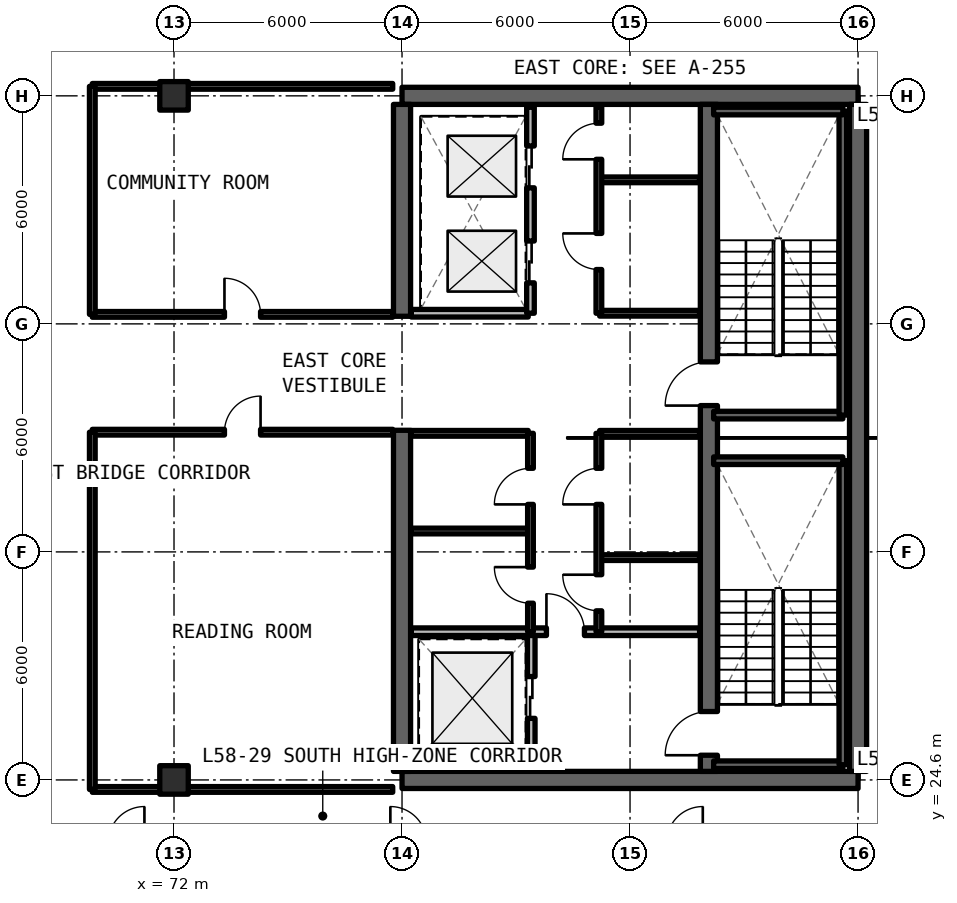
"""IFC4 building model, lengths in metres.
Left out: names, types, materials, properties, quantities, classifications, styles, units other than length and angle.
Written with IfcOpenShell. Run it as: python <this file> out.ifc"""

import sys

from ifc_helpers import new_model, si_unit, direction, frame, frame_2d, origin, origin_2d, place, context, subcontext, project, spatial, rectangle, extrude, element, fill, save


model = new_model("IFC4")
c1 = context("Model", 3, precision=1e-05, world=origin(), true_north=direction((0.0, 1.0)))
c2 = subcontext(c1, "Body", "Model", "MODEL_VIEW")
j1 = project(units=[si_unit("LENGTHUNIT", "METRE"), si_unit("PLANEANGLEUNIT", "RADIAN")], contexts=[c1])
p1 = place(None, origin())
s1 = spatial("IfcSite", under=j1, at=p1, CompositionType="ELEMENT")
p2 = place(p1, origin())
s2 = spatial("IfcBuilding", under=s1, at=p2, CompositionType="ELEMENT")
p3 = place(p2, frame((0.0, 0.0, 208.23)))
s3 = spatial("IfcBuildingStorey", under=s2, at=p3, CompositionType="ELEMENT", Elevation=208.23)
for number, where, z_axis, x_axis in (
    (1, (78.0, 24.6, 0.0), (0.0, 0.0, 1.0), (1.0, 0.0, 0.0)),
    (2, (90.0, 42.6, 0.0), (0.0, 0.0, 1.0), (-1.0, 0.0, 0.0)),
):
    element("IfcWall", number, at=place(p3, frame(where, z_axis=z_axis, x_axis=x_axis)), inside=s3, PredefinedType="SHEAR", context=c2, shape_type="SweptSolid", body=[
        extrude(rectangle(XDim=12.0, YDim=0.45, at=frame_2d((6.0, 0.0))), origin(), (0.0, 0.0, 1.0), 3.63),
    ])
p4 = place(p3, frame((90.0, 24.825, 0.0), z_axis=(0.0, 0.0, 1.0), x_axis=(0.0, 1.0, 0.0)))
e3 = element("IfcWall", 3, at=p4, inside=s3, PredefinedType="SHEAR", context=c2, shape_type="SweptSolid", body=[
    extrude(rectangle(XDim=17.55, YDim=0.45, at=frame_2d((8.775, 0.0))), origin(), (0.0, 0.0, 1.0), 3.63),
])
p5 = place(p3, frame((78.0, 24.825, 0.0), z_axis=(0.0, 0.0, 1.0), x_axis=(0.0, 1.0, 0.0)))
e4 = element("IfcWall", 4, at=p5, inside=s3, PredefinedType="SHEAR", context=c2, shape_type="SweptSolid", body=[
    extrude(rectangle(XDim=8.975, YDim=0.45, at=frame_2d((4.488, 0.0))), origin(), (0.0, 0.0, 1.0), 3.63),
])
p6 = place(p3, frame((78.0, 36.8, 0.0), z_axis=(0.0, 0.0, 1.0), x_axis=(0.0, 1.0, 0.0)))
e5 = element("IfcWall", 5, at=p6, inside=s3, PredefinedType="SHEAR", context=c2, shape_type="SweptSolid", body=[
    extrude(rectangle(XDim=5.575, YDim=0.45, at=frame_2d((2.788, 0.0))), origin(), (0.0, 0.0, 1.0), 3.63),
])
p7 = place(p3, frame((86.075, 24.825, 0.0), z_axis=(0.0, 0.0, 1.0), x_axis=(0.0, 1.0, 0.0)))
e6 = element("IfcWall", 6, at=p7, inside=s3, PredefinedType="SHEAR", context=c2, shape_type="SweptSolid", body=[
    extrude(rectangle(XDim=17.55, YDim=0.45, at=frame_2d((8.775, 0.0))), origin(), (0.0, 0.0, 1.0), 3.63),
])
p8 = place(p7, frame((0.425, 0.0, 0.0)))
e7 = element("IfcOpeningElement", 7, at=p8, cuts=e6, PredefinedType="OPENING", context=c2, shape_type="SweptSolid", body=[
    extrude(rectangle(XDim=1.15, YDim=2.15, at=frame_2d((0.575, 1.075))), frame((0.0, 0.235, 0.0), z_axis=(0.0, -1.0, 0.0), x_axis=(1.0, 0.0, 0.0)), (0.0, 0.0, 1.0), 0.47),
])
p9 = place(p7, frame((9.625, 0.0, 0.0)))
e8 = element("IfcOpeningElement", 8, at=p9, cuts=e6, PredefinedType="OPENING", context=c2, shape_type="SweptSolid", body=[
    extrude(rectangle(XDim=1.15, YDim=2.15, at=frame_2d((0.575, 1.075))), frame((0.0, 0.235, 0.0), z_axis=(0.0, -1.0, 0.0), x_axis=(1.0, 0.0, 0.0)), (0.0, 0.0, 1.0), 0.47),
])
for number, where, z_axis, x_axis in (
    (9, (72.0, 24.6, 0.0), (0.0, 0.0, 1.0), (1.0, 0.0, 0.0)),
    (10, (72.0, 42.6, 0.0), (0.0, 0.0, 1.0), (1.0, 0.0, 0.0)),
):
    element("IfcColumn", number, at=place(p3, frame(where, z_axis=z_axis, x_axis=x_axis)), inside=s3, PredefinedType="COLUMN", context=c2, shape_type="SweptSolid", body=[
        extrude(rectangle(XDim=0.75, YDim=0.75, at=origin_2d()), origin(), (0.0, 0.0, 1.0), 3.63),
    ])
p10 = place(p3, frame((81.4, 24.92, 0.0), z_axis=(0.0, 0.0, 1.0), x_axis=(0.0, 1.0, 0.0)))
e11 = element("IfcWall", 11, at=p10, inside=s3, PredefinedType="SOLIDWALL", context=c2, shape_type="SweptSolid", body=[
    extrude(rectangle(XDim=3.58, YDim=0.2, at=frame_2d((1.79, 0.0))), origin(), (0.0, 0.0, 1.0), 2.63),
])
p11 = place(p10, frame((1.3, 0.0, 0.0)))
e12 = element("IfcOpeningElement", 12, at=p11, cuts=e11, PredefinedType="OPENING", context=c2, shape_type="SweptSolid", body=[
    extrude(rectangle(XDim=1.1, YDim=2.2, at=frame_2d((0.55, 1.1))), frame((0.0, 0.11, 0.0), z_axis=(0.0, -1.0, 0.0), x_axis=(1.0, 0.0, 0.0)), (0.0, 0.0, 1.0), 0.22),
])
p12 = place(p3, frame((78.245, 28.5, 0.0), z_axis=(0.0, 0.0, 1.0), x_axis=(1.0, 0.0, 0.0)))
e13 = element("IfcWall", 13, at=p12, inside=s3, PredefinedType="SOLIDWALL", context=c2, shape_type="SweptSolid", body=[
    extrude(rectangle(XDim=7.585, YDim=0.2, at=frame_2d((3.792, 0.0))), origin(), (0.0, 0.0, 1.0), 2.63),
])
p13 = place(p12, frame((3.555, 0.0, 0.0)))
e14 = element("IfcOpeningElement", 14, at=p13, cuts=e13, PredefinedType="OPENING", context=c2, shape_type="SweptSolid", body=[
    extrude(rectangle(XDim=1.0, YDim=2.15, at=frame_2d((0.5, 1.075))), frame((0.0, 0.11, 0.0), z_axis=(0.0, -1.0, 0.0), x_axis=(1.0, 0.0, 0.0)), (0.0, 0.0, 1.0), 0.22),
])
for number, where, z_axis, x_axis in (
    (15, (83.2, 30.45, 0.0), (0.0, 0.0, 1.0), (1.0, 0.0, 0.0)),
    (16, (83.2, 33.72, 0.0), (0.0, 0.0, 1.0), (1.0, 0.0, 0.0)),
):
    element("IfcWall", number, at=place(p3, frame(where, z_axis=z_axis, x_axis=x_axis)), inside=s3, PredefinedType="SOLIDWALL", context=c2, shape_type="SweptSolid", body=[
        extrude(rectangle(XDim=2.63, YDim=0.15, at=frame_2d((1.315, 0.0))), origin(), (0.0, 0.0, 1.0), 2.63),
    ])
p14 = place(p3, frame((83.18, 28.5, 0.0), z_axis=(0.0, 0.0, 1.0), x_axis=(0.0, 1.0, 0.0)))
e17 = element("IfcWall", 17, at=p14, inside=s3, PredefinedType="SOLIDWALL", context=c2, shape_type="SweptSolid", body=[
    extrude(rectangle(XDim=5.22, YDim=0.15, at=frame_2d((2.61, 0.0))), origin(), (0.0, 0.0, 1.0), 2.63),
])
p15 = place(p14, frame((0.55, 0.0, 0.0)))
e18 = element("IfcOpeningElement", 18, at=p15, cuts=e17, PredefinedType="OPENING", context=c2, shape_type="SweptSolid", body=[
    extrude(rectangle(XDim=0.95, YDim=2.15, at=frame_2d((0.475, 1.075))), frame((0.0, 0.085, 0.0), z_axis=(0.0, -1.0, 0.0), x_axis=(1.0, 0.0, 0.0)), (0.0, 0.0, 1.0), 0.17),
])
p16 = place(p14, frame((3.35, 0.0, 0.0)))
e19 = element("IfcOpeningElement", 19, at=p16, cuts=e17, PredefinedType="OPENING", context=c2, shape_type="SweptSolid", body=[
    extrude(rectangle(XDim=0.95, YDim=2.15, at=frame_2d((0.475, 1.075))), frame((0.0, 0.085, 0.0), z_axis=(0.0, -1.0, 0.0), x_axis=(1.0, 0.0, 0.0)), (0.0, 0.0, 1.0), 0.17),
])
for number, where, z_axis, x_axis in (
    (20, (78.245, 31.15, 0.0), (0.0, 0.0, 1.0), (1.0, 0.0, 0.0)),
    (21, (78.245, 33.72, 0.0), (0.0, 0.0, 1.0), (1.0, 0.0, 0.0)),
):
    element("IfcWall", number, at=place(p3, frame(where, z_axis=z_axis, x_axis=x_axis)), inside=s3, PredefinedType="SOLIDWALL", context=c2, shape_type="SweptSolid", body=[
        extrude(rectangle(XDim=3.075, YDim=0.15, at=frame_2d((1.538, 0.0))), origin(), (0.0, 0.0, 1.0), 2.63),
    ])
p17 = place(p3, frame((81.38, 28.5, 0.0), z_axis=(0.0, 0.0, 1.0), x_axis=(0.0, 1.0, 0.0)))
e22 = element("IfcWall", 22, at=p17, inside=s3, PredefinedType="SOLIDWALL", context=c2, shape_type="SweptSolid", body=[
    extrude(rectangle(XDim=5.22, YDim=0.15, at=frame_2d((2.61, 0.0))), origin(), (0.0, 0.0, 1.0), 2.63),
])
p18 = place(p17, frame((0.75, 0.0, 0.0)))
e23 = element("IfcOpeningElement", 23, at=p18, cuts=e22, PredefinedType="OPENING", context=c2, shape_type="SweptSolid", body=[
    extrude(rectangle(XDim=0.95, YDim=2.15, at=frame_2d((0.475, 1.075))), frame((0.0, 0.085, 0.0), z_axis=(0.0, -1.0, 0.0), x_axis=(1.0, 0.0, 0.0)), (0.0, 0.0, 1.0), 0.17),
])
p19 = place(p17, frame((3.35, 0.0, 0.0)))
e24 = element("IfcOpeningElement", 24, at=p19, cuts=e22, PredefinedType="OPENING", context=c2, shape_type="SweptSolid", body=[
    extrude(rectangle(XDim=0.95, YDim=2.15, at=frame_2d((0.475, 1.075))), frame((0.0, 0.085, 0.0), z_axis=(0.0, -1.0, 0.0), x_axis=(1.0, 0.0, 0.0)), (0.0, 0.0, 1.0), 0.17),
])
for number, where, z_axis, x_axis in (
    (25, (83.2, 36.88, 0.0), (0.0, 0.0, 1.0), (1.0, 0.0, 0.0)),
    (26, (83.2, 40.39, 0.0), (0.0, 0.0, 1.0), (1.0, 0.0, 0.0)),
):
    element("IfcWall", number, at=place(p3, frame(where, z_axis=z_axis, x_axis=x_axis)), inside=s3, PredefinedType="SOLIDWALL", context=c2, shape_type="SweptSolid", body=[
        extrude(rectangle(XDim=2.63, YDim=0.15, at=frame_2d((1.315, 0.0))), origin(), (0.0, 0.0, 1.0), 2.63),
    ])
p20 = place(p3, frame((83.18, 36.88, 0.0), z_axis=(0.0, 0.0, 1.0), x_axis=(0.0, 1.0, 0.0)))
e27 = element("IfcWall", 27, at=p20, inside=s3, PredefinedType="SOLIDWALL", context=c2, shape_type="SweptSolid", body=[
    extrude(rectangle(XDim=5.42, YDim=0.15, at=frame_2d((2.71, 0.0))), origin(), (0.0, 0.0, 1.0), 2.63),
])
p21 = place(p20, frame((1.15, 0.0, 0.0)))
e28 = element("IfcOpeningElement", 28, at=p21, cuts=e27, PredefinedType="OPENING", context=c2, shape_type="SweptSolid", body=[
    extrude(rectangle(XDim=0.95, YDim=2.15, at=frame_2d((0.475, 1.075))), frame((0.0, 0.085, 0.0), z_axis=(0.0, -1.0, 0.0), x_axis=(1.0, 0.0, 0.0)), (0.0, 0.0, 1.0), 0.17),
])
p22 = place(p20, frame((4.05, 0.0, 0.0)))
e29 = element("IfcOpeningElement", 29, at=p22, cuts=e27, PredefinedType="OPENING", context=c2, shape_type="SweptSolid", body=[
    extrude(rectangle(XDim=0.95, YDim=2.15, at=frame_2d((0.475, 1.075))), frame((0.0, 0.085, 0.0), z_axis=(0.0, -1.0, 0.0), x_axis=(1.0, 0.0, 0.0)), (0.0, 0.0, 1.0), 0.17),
])
p23 = place(p3, frame((78.245, 36.88, 0.0), z_axis=(0.0, 0.0, 1.0), x_axis=(1.0, 0.0, 0.0)))
e30 = element("IfcWall", 30, at=p23, inside=s3, PredefinedType="SOLIDWALL", context=c2, shape_type="SweptSolid", body=[
    extrude(rectangle(XDim=3.075, YDim=0.2, at=frame_2d((1.538, 0.0))), origin(), (0.0, 0.0, 1.0), 2.63),
])
p24 = place(p3, frame((81.38, 36.88, 0.0), z_axis=(0.0, 0.0, 1.0), x_axis=(0.0, 1.0, 0.0)))
e31 = element("IfcWall", 31, at=p24, inside=s3, PredefinedType="SOLIDWALL", context=c2, shape_type="SweptSolid", body=[
    extrude(rectangle(XDim=5.42, YDim=0.2, at=frame_2d((2.71, 0.0))), origin(), (0.0, 0.0, 1.0), 2.63),
])
p25 = place(p24, frame((0.8, 0.0, 0.0)))
e32 = element("IfcOpeningElement", 32, at=p25, cuts=e31, PredefinedType="OPENING", context=c2, shape_type="SweptSolid", body=[
    extrude(rectangle(XDim=1.1, YDim=2.2, at=frame_2d((0.55, 1.1))), frame((0.0, 0.11, 0.0), z_axis=(0.0, -1.0, 0.0), x_axis=(1.0, 0.0, 0.0)), (0.0, 0.0, 1.0), 0.22),
])
p26 = place(p24, frame((3.3, 0.0, 0.0)))
e33 = element("IfcOpeningElement", 33, at=p26, cuts=e31, PredefinedType="OPENING", context=c2, shape_type="SweptSolid", body=[
    extrude(rectangle(XDim=1.1, YDim=2.2, at=frame_2d((0.55, 1.1))), frame((0.0, 0.11, 0.0), z_axis=(0.0, -1.0, 0.0), x_axis=(1.0, 0.0, 0.0)), (0.0, 0.0, 1.0), 0.22),
])
p27 = place(p3, frame((69.85, 24.35, 0.0), z_axis=(0.0, 0.0, 1.0), x_axis=(1.0, 0.0, 0.0)))
e34 = element("IfcWall", 34, at=p27, inside=s3, PredefinedType="SOLIDWALL", context=c2, shape_type="SweptSolid", body=[
    extrude(rectangle(XDim=7.905, YDim=0.15, at=frame_2d((3.952, 0.0))), origin(), (0.0, 0.0, 1.0), 2.63),
])
p28 = place(p3, frame((69.85, 33.75, 0.0), z_axis=(0.0, 0.0, 1.0), x_axis=(1.0, 0.0, 0.0)))
e35 = element("IfcWall", 35, at=p28, inside=s3, PredefinedType="SOLIDWALL", context=c2, shape_type="SweptSolid", body=[
    extrude(rectangle(XDim=7.905, YDim=0.15, at=frame_2d((3.952, 0.0))), origin(), (0.0, 0.0, 1.0), 2.63),
])
p29 = place(p28, frame((3.478, 0.0, 0.0)))
e36 = element("IfcOpeningElement", 36, at=p29, cuts=e35, PredefinedType="OPENING", context=c2, shape_type="SweptSolid", body=[
    extrude(rectangle(XDim=0.95, YDim=2.15, at=frame_2d((0.475, 1.075))), frame((0.0, 0.085, 0.0), z_axis=(0.0, -1.0, 0.0), x_axis=(1.0, 0.0, 0.0)), (0.0, 0.0, 1.0), 0.17),
])
p30 = place(p3, frame((69.85, 24.35, 0.0), z_axis=(0.0, 0.0, 1.0), x_axis=(0.0, 1.0, 0.0)))
e37 = element("IfcWall", 37, at=p30, inside=s3, PredefinedType="SOLIDWALL", context=c2, shape_type="SweptSolid", body=[
    extrude(rectangle(XDim=9.4, YDim=0.15, at=frame_2d((4.7, 0.0))), origin(), (0.0, 0.0, 1.0), 2.63),
])
p31 = place(p3, frame((69.85, 36.85, 0.0), z_axis=(0.0, 0.0, 1.0), x_axis=(1.0, 0.0, 0.0)))
e38 = element("IfcWall", 38, at=p31, inside=s3, PredefinedType="SOLIDWALL", context=c2, shape_type="SweptSolid", body=[
    extrude(rectangle(XDim=7.905, YDim=0.15, at=frame_2d((3.952, 0.0))), origin(), (0.0, 0.0, 1.0), 2.63),
])
p32 = place(p31, frame((3.478, 0.0, 0.0)))
e39 = element("IfcOpeningElement", 39, at=p32, cuts=e38, PredefinedType="OPENING", context=c2, shape_type="SweptSolid", body=[
    extrude(rectangle(XDim=0.95, YDim=2.15, at=frame_2d((0.475, 1.075))), frame((0.0, 0.085, 0.0), z_axis=(0.0, -1.0, 0.0), x_axis=(1.0, 0.0, 0.0)), (0.0, 0.0, 1.0), 0.17),
])
p33 = place(p3, frame((69.85, 42.85, 0.0), z_axis=(0.0, 0.0, 1.0), x_axis=(1.0, 0.0, 0.0)))
e40 = element("IfcWall", 40, at=p33, inside=s3, PredefinedType="SOLIDWALL", context=c2, shape_type="SweptSolid", body=[
    extrude(rectangle(XDim=7.905, YDim=0.15, at=frame_2d((3.952, 0.0))), origin(), (0.0, 0.0, 1.0), 2.63),
])
p34 = place(p3, frame((69.85, 36.85, 0.0), z_axis=(0.0, 0.0, 1.0), x_axis=(0.0, 1.0, 0.0)))
e41 = element("IfcWall", 41, at=p34, inside=s3, PredefinedType="SOLIDWALL", context=c2, shape_type="SweptSolid", body=[
    extrude(rectangle(XDim=6.0, YDim=0.15, at=frame_2d((3.0, 0.0))), origin(), (0.0, 0.0, 1.0), 2.63),
])
p35 = place(p3, frame((86.2, 25.0, 0.0), z_axis=(0.0, 0.0, 1.0), x_axis=(1.0, 0.0, 0.0)))
e42 = element("IfcWall", 42, at=p35, inside=s3, PredefinedType="SOLIDWALL", context=c2, shape_type="SweptSolid", body=[
    extrude(rectangle(XDim=3.4, YDim=0.2, at=frame_2d((1.7, 0.0))), origin(), (0.0, 0.0, 1.0), 3.63),
])
p36 = place(p3, frame((89.6, 25.0, 0.0), z_axis=(0.0, 0.0, 1.0), x_axis=(0.0, 1.0, 0.0)))
e43 = element("IfcWall", 43, at=p36, inside=s3, PredefinedType="SOLIDWALL", context=c2, shape_type="SweptSolid", body=[
    extrude(rectangle(XDim=8.0, YDim=0.2, at=frame_2d((4.0, 0.0))), origin(), (0.0, 0.0, 1.0), 3.63),
])
for number, where, z_axis, x_axis in (
    (44, (89.6, 33.0, 0.0), (0.0, 0.0, 1.0), (-1.0, 0.0, 0.0)),
    (45, (86.2, 34.2, 0.0), (0.0, 0.0, 1.0), (1.0, 0.0, 0.0)),
):
    element("IfcWall", number, at=place(p3, frame(where, z_axis=z_axis, x_axis=x_axis)), inside=s3, PredefinedType="SOLIDWALL", context=c2, shape_type="SweptSolid", body=[
        extrude(rectangle(XDim=3.4, YDim=0.2, at=frame_2d((1.7, 0.0))), origin(), (0.0, 0.0, 1.0), 3.63),
    ])
p37 = place(p3, frame((89.6, 34.2, 0.0), z_axis=(0.0, 0.0, 1.0), x_axis=(0.0, 1.0, 0.0)))
e46 = element("IfcWall", 46, at=p37, inside=s3, PredefinedType="SOLIDWALL", context=c2, shape_type="SweptSolid", body=[
    extrude(rectangle(XDim=8.0, YDim=0.2, at=frame_2d((4.0, 0.0))), origin(), (0.0, 0.0, 1.0), 3.63),
])
p38 = place(p3, frame((89.6, 42.2, 0.0), z_axis=(0.0, 0.0, 1.0), x_axis=(-1.0, 0.0, 0.0)))
e47 = element("IfcWall", 47, at=p38, inside=s3, PredefinedType="SOLIDWALL", context=c2, shape_type="SweptSolid", body=[
    extrude(rectangle(XDim=3.4, YDim=0.2, at=frame_2d((1.7, 0.0))), origin(), (0.0, 0.0, 1.0), 3.63),
])
p39 = place(p11, origin())
e48 = element("IfcDoor", 48, at=p39, inside=s3, OperationType="SLIDING_TO_LEFT", PredefinedType="DOOR", context=c2, shape_type="SweptSolid", body=[
    extrude(rectangle(XDim=1.1, YDim=2.2, at=frame_2d((0.55, 1.1))), frame((0.0, 0.025, 0.0), z_axis=(0.0, -1.0, 0.0), x_axis=(1.0, 0.0, 0.0)), (0.0, 0.0, 1.0), 0.05),
])
fill(e12, e48)
p40 = place(p13, origin())
e49 = element("IfcDoor", 49, at=p40, inside=s3, OperationType="SINGLE_SWING_LEFT", PredefinedType="DOOR", context=c2, shape_type="SweptSolid", body=[
    extrude(rectangle(XDim=1.0, YDim=2.15, at=frame_2d((0.5, 1.075))), frame((0.0, 0.025, 0.0), z_axis=(0.0, -1.0, 0.0), x_axis=(1.0, 0.0, 0.0)), (0.0, 0.0, 1.0), 0.05),
])
fill(e14, e49)
p41 = place(p15, origin())
e50 = element("IfcDoor", 50, at=p41, inside=s3, OperationType="SINGLE_SWING_RIGHT", PredefinedType="DOOR", context=c2, shape_type="SweptSolid", body=[
    extrude(rectangle(XDim=0.95, YDim=2.15, at=frame_2d((0.475, 1.075))), frame((0.0, 0.025, 0.0), z_axis=(0.0, -1.0, 0.0), x_axis=(1.0, 0.0, 0.0)), (0.0, 0.0, 1.0), 0.05),
])
fill(e18, e50)
p42 = place(p16, origin())
e51 = element("IfcDoor", 51, at=p42, inside=s3, OperationType="SINGLE_SWING_LEFT", PredefinedType="DOOR", context=c2, shape_type="SweptSolid", body=[
    extrude(rectangle(XDim=0.95, YDim=2.15, at=frame_2d((0.475, 1.075))), frame((0.0, 0.025, 0.0), z_axis=(0.0, -1.0, 0.0), x_axis=(1.0, 0.0, 0.0)), (0.0, 0.0, 1.0), 0.05),
])
fill(e19, e51)
p43 = place(p18, origin())
e52 = element("IfcDoor", 52, at=p43, inside=s3, OperationType="SINGLE_SWING_RIGHT", PredefinedType="DOOR", context=c2, shape_type="SweptSolid", body=[
    extrude(rectangle(XDim=0.95, YDim=2.15, at=frame_2d((0.475, 1.075))), frame((0.0, 0.025, 0.0), z_axis=(0.0, -1.0, 0.0), x_axis=(1.0, 0.0, 0.0)), (0.0, 0.0, 1.0), 0.05),
])
fill(e23, e52)
p44 = place(p19, origin())
e53 = element("IfcDoor", 53, at=p44, inside=s3, OperationType="SINGLE_SWING_LEFT", PredefinedType="DOOR", context=c2, shape_type="SweptSolid", body=[
    extrude(rectangle(XDim=0.95, YDim=2.15, at=frame_2d((0.475, 1.075))), frame((0.0, 0.025, 0.0), z_axis=(0.0, -1.0, 0.0), x_axis=(1.0, 0.0, 0.0)), (0.0, 0.0, 1.0), 0.05),
])
fill(e24, e53)
p45 = place(p21, origin())
e54 = element("IfcDoor", 54, at=p45, inside=s3, OperationType="SINGLE_SWING_RIGHT", PredefinedType="DOOR", context=c2, shape_type="SweptSolid", body=[
    extrude(rectangle(XDim=0.95, YDim=2.15, at=frame_2d((0.475, 1.075))), frame((0.0, 0.025, 0.0), z_axis=(0.0, -1.0, 0.0), x_axis=(1.0, 0.0, 0.0)), (0.0, 0.0, 1.0), 0.05),
])
fill(e28, e54)
p46 = place(p22, origin())
e55 = element("IfcDoor", 55, at=p46, inside=s3, OperationType="SINGLE_SWING_LEFT", PredefinedType="DOOR", context=c2, shape_type="SweptSolid", body=[
    extrude(rectangle(XDim=0.95, YDim=2.15, at=frame_2d((0.475, 1.075))), frame((0.0, 0.025, 0.0), z_axis=(0.0, -1.0, 0.0), x_axis=(1.0, 0.0, 0.0)), (0.0, 0.0, 1.0), 0.05),
])
fill(e29, e55)
p47 = place(p25, origin())
e56 = element("IfcDoor", 56, at=p47, inside=s3, OperationType="SLIDING_TO_LEFT", PredefinedType="DOOR", context=c2, shape_type="SweptSolid", body=[
    extrude(rectangle(XDim=1.1, YDim=2.2, at=frame_2d((0.55, 1.1))), frame((0.0, 0.025, 0.0), z_axis=(0.0, -1.0, 0.0), x_axis=(1.0, 0.0, 0.0)), (0.0, 0.0, 1.0), 0.05),
])
fill(e32, e56)
p48 = place(p26, origin())
e57 = element("IfcDoor", 57, at=p48, inside=s3, OperationType="SLIDING_TO_RIGHT", PredefinedType="DOOR", context=c2, shape_type="SweptSolid", body=[
    extrude(rectangle(XDim=1.1, YDim=2.2, at=frame_2d((0.55, 1.1))), frame((0.0, 0.025, 0.0), z_axis=(0.0, -1.0, 0.0), x_axis=(1.0, 0.0, 0.0)), (0.0, 0.0, 1.0), 0.05),
])
fill(e33, e57)
p49 = place(p29, origin())
e58 = element("IfcDoor", 58, at=p49, inside=s3, OperationType="SINGLE_SWING_RIGHT", PredefinedType="DOOR", context=c2, shape_type="SweptSolid", body=[
    extrude(rectangle(XDim=0.95, YDim=2.15, at=frame_2d((0.475, 1.075))), frame((0.0, 0.025, 0.0), z_axis=(0.0, -1.0, 0.0), x_axis=(1.0, 0.0, 0.0)), (0.0, 0.0, 1.0), 0.05),
])
fill(e36, e58)
p50 = place(p32, origin())
e59 = element("IfcDoor", 59, at=p50, inside=s3, OperationType="SINGLE_SWING_LEFT", PredefinedType="DOOR", context=c2, shape_type="SweptSolid", body=[
    extrude(rectangle(XDim=0.95, YDim=2.15, at=frame_2d((0.475, 1.075))), frame((0.0, 0.025, 0.0), z_axis=(0.0, -1.0, 0.0), x_axis=(1.0, 0.0, 0.0)), (0.0, 0.0, 1.0), 0.05),
])
fill(e39, e59)
p51 = place(p8, origin())
e60 = element("IfcDoor", 60, at=p51, inside=s3, OperationType="SINGLE_SWING_LEFT", PredefinedType="DOOR", context=c2, shape_type="SweptSolid", body=[
    extrude(rectangle(XDim=1.15, YDim=2.15, at=frame_2d((0.575, 1.075))), frame((0.0, 0.025, 0.0), z_axis=(0.0, -1.0, 0.0), x_axis=(1.0, 0.0, 0.0)), (0.0, 0.0, 1.0), 0.05),
])
fill(e7, e60)
p52 = place(p9, origin())
e61 = element("IfcDoor", 61, at=p52, inside=s3, OperationType="SINGLE_SWING_RIGHT", PredefinedType="DOOR", context=c2, shape_type="SweptSolid", body=[
    extrude(rectangle(XDim=1.15, YDim=2.15, at=frame_2d((0.575, 1.075))), frame((0.0, 0.025, 0.0), z_axis=(0.0, -1.0, 0.0), x_axis=(1.0, 0.0, 0.0)), (0.0, 0.0, 1.0), 0.05),
])
fill(e8, e61)
save(model, sys.argv[1])
